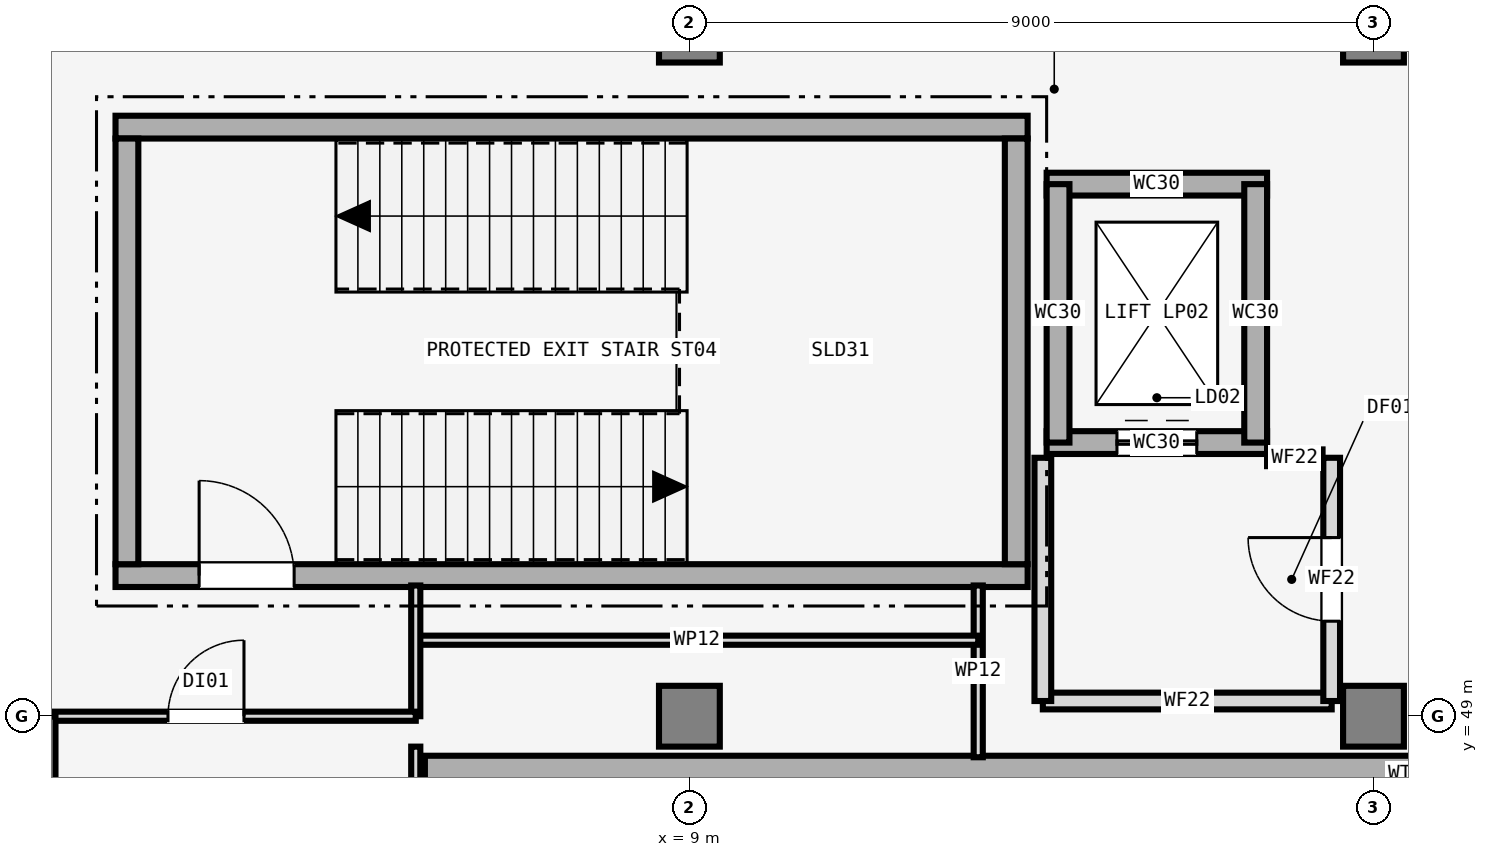
"""IFC4 building model, lengths in metres.
Left out: names, types, materials, properties, quantities, classifications, styles, units other than length and angle.
Written with IfcOpenShell. Run it as: python <this file> out.ifc"""

import sys

from ifc_helpers import new_model, si_unit, direction, frame, frame_2d, origin, origin_2d, place, context, subcontext, project, spatial, rectangle, extrude, element, fill, save


model = new_model("IFC4")
c1 = context("Model", 3, precision=1e-05, world=origin(), true_north=direction((0.0, 1.0)))
c2 = subcontext(c1, "Body", "Model", "MODEL_VIEW")
j1 = project(units=[si_unit("LENGTHUNIT", "METRE"), si_unit("PLANEANGLEUNIT", "RADIAN")], contexts=[c1])
p1 = place(None, origin())
s1 = spatial("IfcSite", under=j1, at=p1, CompositionType="ELEMENT")
p2 = place(p1, origin())
s2 = spatial("IfcBuilding", under=s1, at=p2, CompositionType="ELEMENT")
p3 = place(p2, frame((0.0, 0.0, -5.4)))
s3 = spatial("IfcBuildingStorey", under=s2, at=p3, CompositionType="ELEMENT", Elevation=-5.4)
p4 = place(p3, frame((31.48, 48.24, 0.0), z_axis=(0.0, 0.0, 1.0), x_axis=(-1.0, 0.0, 0.0)))
e1 = element("IfcWall", 1, at=p4, inside=s3, PredefinedType="SOLIDWALL", context=c2, shape_type="SweptSolid", body=[
    extrude(rectangle(XDim=25.96, YDim=0.48, at=frame_2d((12.98, 0.0))), origin(), (0.0, 0.0, 1.0), 5.08),
])
for number, where, z_axis, x_axis in (
    (2, (9.0, 49.0, 0.0), (0.0, 0.0, 1.0), (1.0, 0.0, 0.0)),
    (3, (9.0, 58.0, 0.0), (0.0, 0.0, 1.0), (1.0, 0.0, 0.0)),
    (4, (18.0, 49.0, 0.0), (0.0, 0.0, 1.0), (1.0, 0.0, 0.0)),
    (5, (18.0, 58.0, 0.0), (0.0, 0.0, 1.0), (1.0, 0.0, 0.0)),
):
    element("IfcColumn", number, at=place(p3, frame(where, z_axis=z_axis, x_axis=x_axis)), inside=s3, PredefinedType="COLUMN", context=c2, shape_type="SweptSolid", body=[
        extrude(rectangle(XDim=0.8, YDim=0.8, at=origin_2d()), origin(), (0.0, 0.0, 1.0), 5.4),
    ])
p5 = place(p3, frame((1.45, 50.85, 0.0), z_axis=(0.0, 0.0, 1.0), x_axis=(1.0, 0.0, 0.0)))
e6 = element("IfcWall", 6, at=p5, inside=s3, PredefinedType="SHEAR", context=c2, shape_type="SweptSolid", body=[
    extrude(rectangle(XDim=12.0, YDim=0.3, at=frame_2d((6.0, 0.0))), origin(), (0.0, 0.0, 1.0), 5.4),
])
p6 = place(p5, frame((1.1, 0.0, 0.0)))
e7 = element("IfcOpeningElement", 7, at=p6, cuts=e6, PredefinedType="OPENING", context=c2, shape_type="SweptSolid", body=[
    extrude(rectangle(XDim=1.25, YDim=2.15, at=frame_2d((0.625, 1.075))), frame((0.0, 0.16, 0.0), z_axis=(0.0, -1.0, 0.0), x_axis=(1.0, 0.0, 0.0)), (0.0, 0.0, 1.0), 0.32),
])
p7 = place(p3, frame((13.45, 56.75, 0.0), z_axis=(0.0, 0.0, 1.0), x_axis=(-1.0, 0.0, 0.0)))
e8 = element("IfcWall", 8, at=p7, inside=s3, PredefinedType="SHEAR", context=c2, shape_type="SweptSolid", body=[
    extrude(rectangle(XDim=12.0, YDim=0.3, at=frame_2d((6.0, 0.0))), origin(), (0.0, 0.0, 1.0), 5.4),
])
for number, where, z_axis, x_axis in (
    (9, (1.6, 56.6, 0.0), (0.0, 0.0, 1.0), (0.0, -1.0, 0.0)),
    (10, (13.3, 51.0, 0.0), (0.0, 0.0, 1.0), (0.0, 1.0, 0.0)),
):
    element("IfcWall", number, at=place(p3, frame(where, z_axis=z_axis, x_axis=x_axis)), inside=s3, PredefinedType="SHEAR", context=c2, shape_type="SweptSolid", body=[
        extrude(rectangle(XDim=5.6, YDim=0.3, at=frame_2d((2.8, 0.0))), origin(), (0.0, 0.0, 1.0), 5.4),
    ])
p8 = place(p3, frame((13.7, 52.6, 0.0), z_axis=(0.0, 0.0, 1.0), x_axis=(1.0, 0.0, 0.0)))
e11 = element("IfcWall", 11, at=p8, inside=s3, PredefinedType="SHEAR", context=c2, shape_type="SweptSolid", body=[
    extrude(rectangle(XDim=2.9, YDim=0.3, at=frame_2d((1.45, 0.0))), origin(), (0.0, 0.0, 1.0), 5.4),
])
p9 = place(p8, frame((0.925, 0.0, 0.0)))
e12 = element("IfcOpeningElement", 12, at=p9, cuts=e11, PredefinedType="OPENING", context=c2, shape_type="SweptSolid", body=[
    extrude(rectangle(XDim=1.05, YDim=2.15, at=frame_2d((0.525, 1.075))), frame((0.0, 0.16, 0.0), z_axis=(0.0, -1.0, 0.0), x_axis=(1.0, 0.0, 0.0)), (0.0, 0.0, 1.0), 0.32),
])
p10 = place(p3, frame((16.6, 56.0, 0.0), z_axis=(0.0, 0.0, 1.0), x_axis=(-1.0, 0.0, 0.0)))
e13 = element("IfcWall", 13, at=p10, inside=s3, PredefinedType="SHEAR", context=c2, shape_type="SweptSolid", body=[
    extrude(rectangle(XDim=2.9, YDim=0.3, at=frame_2d((1.45, 0.0))), origin(), (0.0, 0.0, 1.0), 5.4),
])
for number, where, z_axis, x_axis in (
    (14, (13.85, 56.0, 0.0), (0.0, 0.0, 1.0), (0.0, -1.0, 0.0)),
    (15, (16.45, 52.6, 0.0), (0.0, 0.0, 1.0), (0.0, 1.0, 0.0)),
):
    element("IfcWall", number, at=place(p3, frame(where, z_axis=z_axis, x_axis=x_axis)), inside=s3, PredefinedType="SHEAR", context=c2, shape_type="SweptSolid", body=[
        extrude(rectangle(XDim=3.4, YDim=0.3, at=frame_2d((1.7, 0.0))), origin(), (0.0, 0.0, 1.0), 5.4),
    ])
p11 = place(p3, frame((13.65, 49.2, 0.0), z_axis=(0.0, 0.0, 1.0), x_axis=(1.0, 0.0, 0.0)))
e16 = element("IfcWall", 16, at=p11, inside=s3, PredefinedType="SOLIDWALL", context=c2, shape_type="SweptSolid", body=[
    extrude(rectangle(XDim=3.8, YDim=0.22, at=frame_2d((1.9, 0.0))), origin(), (0.0, 0.0, 1.0), 4.05),
])
p12 = place(p3, frame((13.65, 49.2, 0.0), z_axis=(0.0, 0.0, 1.0), x_axis=(0.0, 1.0, 0.0)))
e17 = element("IfcWall", 17, at=p12, inside=s3, PredefinedType="SOLIDWALL", context=c2, shape_type="SweptSolid", body=[
    extrude(rectangle(XDim=3.2, YDim=0.22, at=frame_2d((1.6, 0.0))), origin(), (0.0, 0.0, 1.0), 4.05),
])
p13 = place(p3, frame((17.45, 49.2, 0.0), z_axis=(0.0, 0.0, 1.0), x_axis=(0.0, 1.0, 0.0)))
e18 = element("IfcWall", 18, at=p13, inside=s3, PredefinedType="SOLIDWALL", context=c2, shape_type="SweptSolid", body=[
    extrude(rectangle(XDim=3.2, YDim=0.22, at=frame_2d((1.6, 0.0))), origin(), (0.0, 0.0, 1.0), 4.05),
])
p14 = place(p13, frame((1.05, 0.0, 0.0)))
e19 = element("IfcOpeningElement", 19, at=p14, cuts=e18, PredefinedType="OPENING", context=c2, shape_type="SweptSolid", body=[
    extrude(rectangle(XDim=1.1, YDim=2.15, at=frame_2d((0.55, 1.075))), frame((0.0, 0.12, 0.0), z_axis=(0.0, -1.0, 0.0), x_axis=(1.0, 0.0, 0.0)), (0.0, 0.0, 1.0), 0.24),
])
p15 = place(p3, frame((16.6, 52.4, 0.0), z_axis=(0.0, 0.0, 1.0), x_axis=(1.0, 0.0, 0.0)))
e20 = element("IfcWall", 20, at=p15, inside=s3, PredefinedType="SOLIDWALL", context=c2, shape_type="SweptSolid", body=[
    extrude(rectangle(XDim=0.73, YDim=0.22, at=frame_2d((0.365, 0.0))), origin(), (0.0, 0.0, 1.0), 4.05),
])
p16 = place(p3, frame((12.8, 50.72, 0.0), z_axis=(0.0, 0.0, 1.0), x_axis=(0.0, -1.0, 0.0)))
e21 = element("IfcWall", 21, at=p16, inside=s3, PredefinedType="PARTITIONING", context=c2, shape_type="SweptSolid", body=[
    extrude(rectangle(XDim=2.26, YDim=0.12, at=frame_2d((1.13, 0.0))), origin(), (0.0, 0.0, 1.0), 4.05),
])
p17 = place(p3, frame((5.4, 50.0, 0.0), z_axis=(0.0, 0.0, 1.0), x_axis=(1.0, 0.0, 0.0)))
e22 = element("IfcWall", 22, at=p17, inside=s3, PredefinedType="PARTITIONING", context=c2, shape_type="SweptSolid", body=[
    extrude(rectangle(XDim=7.4, YDim=0.12, at=frame_2d((3.7, 0.0))), origin(), (0.0, 0.0, 1.0), 4.05),
])
p18 = place(p3, frame((5.4, 49.0, 0.0), z_axis=(0.0, 0.0, 1.0), x_axis=(0.0, 1.0, 0.0)))
e23 = element("IfcWall", 23, at=p18, inside=s3, PredefinedType="PARTITIONING", context=c2, shape_type="SweptSolid", body=[
    extrude(rectangle(XDim=1.72, YDim=0.12, at=frame_2d((0.86, 0.0))), origin(), (0.0, 0.0, 1.0), 4.05),
])
p19 = place(p3, frame((5.4, 48.6, 0.0), z_axis=(0.0, 0.0, 1.0), x_axis=(0.0, -1.0, 0.0)))
e24 = element("IfcWall", 24, at=p19, inside=s3, PredefinedType="PARTITIONING", context=c2, shape_type="SweptSolid", body=[
    extrude(rectangle(XDim=0.6, YDim=0.12, at=frame_2d((0.3, 0.0))), origin(), (0.0, 0.0, 1.0), 4.05),
])
p20 = place(p3, frame((-0.12, 49.0, 0.0), z_axis=(0.0, 0.0, 1.0), x_axis=(1.0, 0.0, 0.0)))
e25 = element("IfcWall", 25, at=p20, inside=s3, PredefinedType="PARTITIONING", context=c2, shape_type="SweptSolid", body=[
    extrude(rectangle(XDim=5.52, YDim=0.12, at=frame_2d((2.76, 0.0))), origin(), (0.0, 0.0, 1.0), 4.05),
])
p21 = place(p20, frame((2.26, 0.0, 0.0)))
e26 = element("IfcOpeningElement", 26, at=p21, cuts=e25, PredefinedType="OPENING", context=c2, shape_type="SweptSolid", body=[
    extrude(rectangle(XDim=1.0, YDim=2.1, at=frame_2d((0.5, 1.05))), frame((0.0, 0.07, 0.0), z_axis=(0.0, -1.0, 0.0), x_axis=(1.0, 0.0, 0.0)), (0.0, 0.0, 1.0), 0.14),
])
p22 = place(p3, frame((0.6, 21.88, 0.0), z_axis=(0.0, 0.0, 1.0), x_axis=(0.0, 1.0, 0.0)))
e27 = element("IfcWall", 27, at=p22, inside=s3, PredefinedType="PARTITIONING", context=c2, shape_type="SweptSolid", body=[
    extrude(rectangle(XDim=27.12, YDim=0.12, at=frame_2d((13.56, 0.0))), origin(), (0.0, 0.0, 1.0), 4.05),
])
p23 = place(p6, origin())
e28 = element("IfcDoor", 28, at=p23, inside=s3, OperationType="SINGLE_SWING_LEFT", PredefinedType="DOOR", context=c2, shape_type="SweptSolid", body=[
    extrude(rectangle(XDim=1.25, YDim=2.15, at=frame_2d((0.625, 1.075))), frame((0.0, 0.025, 0.0), z_axis=(0.0, -1.0, 0.0), x_axis=(1.0, 0.0, 0.0)), (0.0, 0.0, 1.0), 0.05),
])
fill(e7, e28)
p24 = place(p9, origin())
e29 = element("IfcDoor", 29, at=p24, inside=s3, OperationType="DOUBLE_DOOR_SLIDING", PredefinedType="DOOR", context=c2, shape_type="SweptSolid", body=[
    extrude(rectangle(XDim=1.05, YDim=2.15, at=frame_2d((0.525, 1.075))), frame((0.0, 0.025, 0.0), z_axis=(0.0, -1.0, 0.0), x_axis=(1.0, 0.0, 0.0)), (0.0, 0.0, 1.0), 0.05),
])
fill(e12, e29)
p25 = place(p14, origin())
e30 = element("IfcDoor", 30, at=p25, inside=s3, OperationType="SINGLE_SWING_RIGHT", PredefinedType="DOOR", context=c2, shape_type="SweptSolid", body=[
    extrude(rectangle(XDim=1.1, YDim=2.15, at=frame_2d((0.55, 1.075))), frame((0.0, 0.025, 0.0), z_axis=(0.0, -1.0, 0.0), x_axis=(1.0, 0.0, 0.0)), (0.0, 0.0, 1.0), 0.05),
])
fill(e19, e30)
p26 = place(p21, origin())
e31 = element("IfcDoor", 31, at=p26, inside=s3, OperationType="SINGLE_SWING_RIGHT", PredefinedType="DOOR", context=c2, shape_type="SweptSolid", body=[
    extrude(rectangle(XDim=1.0, YDim=2.1, at=frame_2d((0.5, 1.05))), frame((0.0, 0.025, 0.0), z_axis=(0.0, -1.0, 0.0), x_axis=(1.0, 0.0, 0.0)), (0.0, 0.0, 1.0), 0.05),
])
fill(e26, e31)
save(model, sys.argv[1])
